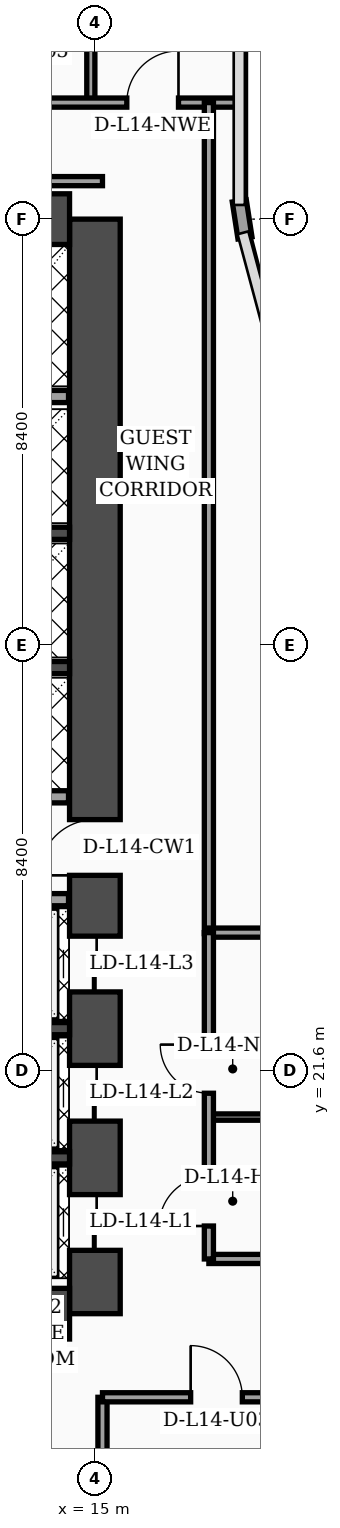
"""IFC4 building model, lengths in metres.
Left out: names, types, materials, properties, quantities, classifications, styles, units other than length and angle.
Written with IfcOpenShell. Run it as: python <this file> out.ifc"""

import sys

from ifc_helpers import new_model, si_unit, direction, frame, frame_2d, origin, place, context, subcontext, project, spatial, rectangle, extrude, element, fill, save


model = new_model("IFC4")
c1 = context("Model", 3, precision=1e-05, world=origin(), true_north=direction((0.0, 1.0)))
c2 = subcontext(c1, "Body", "Model", "MODEL_VIEW")
j1 = project(units=[si_unit("LENGTHUNIT", "METRE"), si_unit("PLANEANGLEUNIT", "RADIAN")], contexts=[c1])
p1 = place(None, origin())
s1 = spatial("IfcSite", under=j1, at=p1, CompositionType="ELEMENT")
p2 = place(p1, origin())
s2 = spatial("IfcBuilding", under=s1, at=p2, CompositionType="ELEMENT")
p3 = place(p2, frame((0.0, 0.0, 62.2)))
s3 = spatial("IfcBuildingStorey", under=s2, at=p3, CompositionType="ELEMENT", Elevation=62.2)
p4 = place(p3, frame((15.0, 16.8, 0.0), z_axis=(0.0, 0.0, 1.0), x_axis=(0.0, 1.0, 0.0)))
e1 = element("IfcWall", 1, at=p4, inside=s3, PredefinedType="SHEAR", context=c2, shape_type="SweptSolid", body=[
    extrude(rectangle(XDim=21.6, YDim=1.0, at=frame_2d((10.8, 0.0))), origin(), (0.0, 0.0, 1.0), 3.56),
])
p5 = place(p4, frame((8.65, 0.0, 0.0)))
e2 = element("IfcOpeningElement", 2, at=p5, cuts=e1, PredefinedType="OPENING", context=c2, shape_type="SweptSolid", body=[
    extrude(rectangle(XDim=1.1, YDim=2.2, at=frame_2d((0.55, 1.1))), frame((0.0, 0.51, 0.0), z_axis=(0.0, -1.0, 0.0), x_axis=(1.0, 0.0, 0.0)), (0.0, 0.0, 1.0), 1.02),
])
p6 = place(p4, frame((1.25, 0.0, 0.0)))
e3 = element("IfcOpeningElement", 3, at=p6, cuts=e1, PredefinedType="OPENING", context=c2, shape_type="SweptSolid", body=[
    extrude(rectangle(XDim=1.1, YDim=2.2, at=frame_2d((0.55, 1.1))), frame((0.0, 0.51, 0.0), z_axis=(0.0, -1.0, 0.0), x_axis=(1.0, 0.0, 0.0)), (0.0, 0.0, 1.0), 1.02),
])
p7 = place(p4, frame((3.8, 0.0, 0.0)))
e4 = element("IfcOpeningElement", 4, at=p7, cuts=e1, PredefinedType="OPENING", context=c2, shape_type="SweptSolid", body=[
    extrude(rectangle(XDim=1.1, YDim=2.2, at=frame_2d((0.55, 1.1))), frame((0.0, 0.51, 0.0), z_axis=(0.0, -1.0, 0.0), x_axis=(1.0, 0.0, 0.0)), (0.0, 0.0, 1.0), 1.02),
])
p8 = place(p4, frame((6.35, 0.0, 0.0)))
e5 = element("IfcOpeningElement", 5, at=p8, cuts=e1, PredefinedType="OPENING", context=c2, shape_type="SweptSolid", body=[
    extrude(rectangle(XDim=1.1, YDim=2.2, at=frame_2d((0.55, 1.1))), frame((0.0, 0.51, 0.0), z_axis=(0.0, -1.0, 0.0), x_axis=(1.0, 0.0, 0.0)), (0.0, 0.0, 1.0), 1.02),
])
for number, where, z_axis, x_axis in (
    (6, (4.7, 38.4, 0.0), (0.0, 0.0, 1.0), (1.0, 0.0, 0.0)),
    (7, (4.7, 16.8, 0.0), (0.0, 0.0, 1.0), (1.0, 0.0, 0.0)),
):
    element("IfcWall", number, at=place(p3, frame(where, z_axis=z_axis, x_axis=x_axis)), inside=s3, PredefinedType="SHEAR", context=c2, shape_type="SweptSolid", body=[
        extrude(rectangle(XDim=9.8, YDim=1.0, at=frame_2d((4.9, 0.0))), origin(), (0.0, 0.0, 1.0), 3.56),
    ])
for number, where, z_axis, x_axis in (
    (8, (12.18, 19.875, 0.0), (0.0, 0.0, 1.0), (1.0, 0.0, 0.0)),
    (9, (12.18, 22.425, 0.0), (0.0, 0.0, 1.0), (1.0, 0.0, 0.0)),
    (10, (12.18, 29.55, 0.0), (0.0, 0.0, 1.0), (1.0, 0.0, 0.0)),
    (11, (12.18, 32.2, 0.0), (0.0, 0.0, 1.0), (1.0, 0.0, 0.0)),
):
    element("IfcWall", number, at=place(p3, frame(where, z_axis=z_axis, x_axis=x_axis)), inside=s3, PredefinedType="SOLIDWALL", context=c2, shape_type="SweptSolid", body=[
        extrude(rectangle(XDim=2.32, YDim=0.24, at=frame_2d((1.16, 0.0))), origin(), (0.0, 0.0, 1.0), 3.56),
    ])
p9 = place(p3, frame((17.962, 38.03, 0.0), z_axis=(0.0, 0.0, 1.0), x_axis=(-0.15141125477, 0.988470855377, 0.0)))
e12 = element("IfcWall", 12, at=p9, inside=s3, PredefinedType="SOLIDWALL", context=c2, shape_type="SweptSolid", body=[
    extrude(rectangle(XDim=0.739, YDim=0.28, at=frame_2d((0.369, 0.0))), origin(), (0.0, 0.0, 1.0), 3.56),
])
p10 = place(p3, frame((12.15, 24.97, 0.0), z_axis=(0.0, 0.0, 1.0), x_axis=(1.0, 0.0, 0.0)))
e13 = element("IfcWall", 13, at=p10, inside=s3, PredefinedType="SOLIDWALL", context=c2, shape_type="SweptSolid", body=[
    extrude(rectangle(XDim=2.33, YDim=0.24, at=frame_2d((1.165, 0.0))), origin(), (0.0, 0.0, 1.0), 2.84),
])
p11 = place(p3, frame((12.25, 27.0, 0.0), z_axis=(0.0, 0.0, 1.0), x_axis=(1.0, 0.0, 0.0)))
e14 = element("IfcWall", 14, at=p11, inside=s3, PredefinedType="SOLIDWALL", context=c2, shape_type="SweptSolid", body=[
    extrude(rectangle(XDim=2.23, YDim=0.24, at=frame_2d((1.115, 0.0))), origin(), (0.0, 0.0, 1.0), 3.56),
])
p12 = place(p3, frame((9.66, 34.9, 0.0), z_axis=(0.0, 0.0, 1.0), x_axis=(1.0, 0.0, 0.0)))
e15 = element("IfcWall", 15, at=p12, inside=s3, PredefinedType="SOLIDWALL", context=c2, shape_type="SweptSolid", body=[
    extrude(rectangle(XDim=4.82, YDim=0.24, at=frame_2d((2.41, 0.0))), origin(), (0.0, 0.0, 1.0), 3.56),
])
p13 = place(p3, frame((15.15, 2.44, 0.0), z_axis=(0.0, 0.0, 1.0), x_axis=(0.0, 1.0, 0.0)))
e16 = element("IfcWall", 16, at=p13, inside=s3, PredefinedType="PARTITIONING", context=c2, shape_type="SweptSolid", body=[
    extrude(rectangle(XDim=12.71, YDim=0.18, at=frame_2d((6.355, 0.0))), origin(), (0.0, 0.0, 1.0), 3.04),
])
p14 = place(p3, frame((15.15, 15.15, 0.0), z_axis=(0.0, 0.0, 1.0), x_axis=(1.0, 0.0, 0.0)))
e17 = element("IfcWall", 17, at=p14, inside=s3, PredefinedType="PARTITIONING", context=c2, shape_type="SweptSolid", body=[
    extrude(rectangle(XDim=6.45, YDim=0.18, at=frame_2d((3.225, 0.0))), origin(), (0.0, 0.0, 1.0), 2.34),
])
p15 = place(p14, frame((1.74, 0.0, 0.0)))
e18 = element("IfcOpeningElement", 18, at=p15, cuts=e17, PredefinedType="OPENING", context=c2, shape_type="SweptSolid", body=[
    extrude(rectangle(XDim=1.02, YDim=2.2, at=frame_2d((0.51, 1.1))), frame((0.0, 0.1, 0.0), z_axis=(0.0, -1.0, 0.0), x_axis=(1.0, 0.0, 0.0)), (0.0, 0.0, 1.0), 0.2),
])
p16 = place(p3, frame((14.92, 40.7, 0.0), z_axis=(0.0, 0.0, 1.0), x_axis=(0.0, 1.0, 0.0)))
e19 = element("IfcWall", 19, at=p16, inside=s3, PredefinedType="PARTITIONING", context=c2, shape_type="SweptSolid", body=[
    extrude(rectangle(XDim=7.1, YDim=0.16, at=frame_2d((3.55, 0.0))), origin(), (0.0, 0.0, 1.0), 3.04),
])
p17 = place(p3, frame((0.08, 40.7, 0.0), z_axis=(0.0, 0.0, 1.0), x_axis=(1.0, 0.0, 0.0)))
e20 = element("IfcWall", 20, at=p17, inside=s3, PredefinedType="PARTITIONING", context=c2, shape_type="SweptSolid", body=[
    extrude(rectangle(XDim=17.77, YDim=0.18, at=frame_2d((8.885, 0.0))), origin(), (0.0, 0.0, 1.0), 2.84),
])
p18 = place(p17, frame((0.9, 0.0, 0.0)))
e21 = element("IfcOpeningElement", 21, at=p18, cuts=e20, PredefinedType="OPENING", context=c2, shape_type="SweptSolid", body=[
    extrude(rectangle(XDim=1.02, YDim=2.2, at=frame_2d((0.51, 1.1))), frame((0.0, 0.1, 0.0), z_axis=(0.0, -1.0, 0.0), x_axis=(1.0, 0.0, 0.0)), (0.0, 0.0, 1.0), 0.2),
])
p19 = place(p17, frame((4.57, 0.0, 0.0)))
e22 = element("IfcOpeningElement", 22, at=p19, cuts=e20, PredefinedType="OPENING", context=c2, shape_type="SweptSolid", body=[
    extrude(rectangle(XDim=1.02, YDim=2.2, at=frame_2d((0.51, 1.1))), frame((0.0, 0.1, 0.0), z_axis=(0.0, -1.0, 0.0), x_axis=(1.0, 0.0, 0.0)), (0.0, 0.0, 1.0), 0.2),
])
p20 = place(p17, frame((10.46, 0.0, 0.0)))
e23 = element("IfcOpeningElement", 23, at=p20, cuts=e20, PredefinedType="OPENING", context=c2, shape_type="SweptSolid", body=[
    extrude(rectangle(XDim=1.02, YDim=2.2, at=frame_2d((0.51, 1.1))), frame((0.0, 0.1, 0.0), z_axis=(0.0, -1.0, 0.0), x_axis=(1.0, 0.0, 0.0)), (0.0, 0.0, 1.0), 0.2),
])
p21 = place(p17, frame((15.55, 0.0, 0.0)))
e24 = element("IfcOpeningElement", 24, at=p21, cuts=e20, PredefinedType="OPENING", context=c2, shape_type="SweptSolid", body=[
    extrude(rectangle(XDim=1.02, YDim=2.2, at=frame_2d((0.51, 1.1))), frame((0.0, 0.1, 0.0), z_axis=(0.0, -1.0, 0.0), x_axis=(1.0, 0.0, 0.0)), (0.0, 0.0, 1.0), 0.2),
])
p22 = place(p3, frame((17.25, 24.3, 0.0), z_axis=(0.0, 0.0, 1.0), x_axis=(0.0, 1.0, 0.0)))
e25 = element("IfcWall", 25, at=p22, inside=s3, PredefinedType="PARTITIONING", context=c2, shape_type="SweptSolid", body=[
    extrude(rectangle(XDim=16.4, YDim=0.18, at=frame_2d((8.2, 0.0))), origin(), (0.0, 0.0, 1.0), 2.84),
])
p23 = place(p3, frame((3.68, 39.15, 0.0), z_axis=(0.0, 0.0, 1.0), x_axis=(1.0, 0.0, 0.0)))
e26 = element("IfcWall", 26, at=p23, inside=s3, PredefinedType="PARTITIONING", context=c2, shape_type="SweptSolid", body=[
    extrude(rectangle(XDim=11.47, YDim=0.18, at=frame_2d((5.735, 0.0))), origin(), (0.0, 0.0, 1.0), 2.84),
])
p24 = place(p3, frame((17.25, 17.88, 0.0), z_axis=(0.0, 0.0, 1.0), x_axis=(1.0, 0.0, 0.0)))
e27 = element("IfcWall", 27, at=p24, inside=s3, PredefinedType="PARTITIONING", context=c2, shape_type="SweptSolid", body=[
    extrude(rectangle(XDim=4.3, YDim=0.18, at=frame_2d((2.15, 0.0))), origin(), (0.0, 0.0, 1.0), 3.56),
])
p25 = place(p3, frame((17.25, 20.68, 0.0), z_axis=(0.0, 0.0, 1.0), x_axis=(1.0, 0.0, 0.0)))
e28 = element("IfcWall", 28, at=p25, inside=s3, PredefinedType="PARTITIONING", context=c2, shape_type="SweptSolid", body=[
    extrude(rectangle(XDim=4.3, YDim=0.125, at=frame_2d((2.15, 0.0))), origin(), (0.0, 0.0, 1.0), 3.56),
])
p26 = place(p3, frame((17.25, 24.32, 0.0), z_axis=(0.0, 0.0, 1.0), x_axis=(1.0, 0.0, 0.0)))
e29 = element("IfcWall", 29, at=p26, inside=s3, PredefinedType="PARTITIONING", context=c2, shape_type="SweptSolid", body=[
    extrude(rectangle(XDim=4.35, YDim=0.18, at=frame_2d((2.175, 0.0))), origin(), (0.0, 0.0, 1.0), 3.56),
])
p27 = place(p3, frame((17.25, 17.88, 0.0), z_axis=(0.0, 0.0, 1.0), x_axis=(0.0, 1.0, 0.0)))
e30 = element("IfcWall", 30, at=p27, inside=s3, PredefinedType="PARTITIONING", context=c2, shape_type="SweptSolid", body=[
    extrude(rectangle(XDim=6.44, YDim=0.18, at=frame_2d((3.22, 0.0))), origin(), (0.0, 0.0, 1.0), 3.09),
])
p28 = place(p27, frame((0.65, 0.0, 0.0)))
e31 = element("IfcOpeningElement", 31, at=p28, cuts=e30, PredefinedType="OPENING", context=c2, shape_type="SweptSolid", body=[
    extrude(rectangle(XDim=0.98, YDim=2.15, at=frame_2d((0.49, 1.075))), frame((0.0, 0.1, 0.0), z_axis=(0.0, -1.0, 0.0), x_axis=(1.0, 0.0, 0.0)), (0.0, 0.0, 1.0), 0.2),
])
p29 = place(p27, frame((3.27, 0.0, 0.0)))
e32 = element("IfcOpeningElement", 32, at=p29, cuts=e30, PredefinedType="OPENING", context=c2, shape_type="SweptSolid", body=[
    extrude(rectangle(XDim=0.96, YDim=2.2, at=frame_2d((0.48, 1.1))), frame((0.0, 0.1, 0.0), z_axis=(0.0, -1.0, 0.0), x_axis=(1.0, 0.0, 0.0)), (0.0, 0.0, 1.0), 0.2),
])
p30 = place(p15, origin())
e33 = element("IfcDoor", 33, at=p30, inside=s3, OperationType="SINGLE_SWING_LEFT", PredefinedType="DOOR", context=c2, shape_type="SweptSolid", body=[
    extrude(rectangle(XDim=1.02, YDim=2.2, at=frame_2d((0.51, 1.1))), frame((0.0, 0.025, 0.0), z_axis=(0.0, -1.0, 0.0), x_axis=(1.0, 0.0, 0.0)), (0.0, 0.0, 1.0), 0.05),
])
fill(e18, e33)
p31 = place(p21, origin())
e34 = element("IfcDoor", 34, at=p31, inside=s3, OperationType="SINGLE_SWING_RIGHT", PredefinedType="DOOR", context=c2, shape_type="SweptSolid", body=[
    extrude(rectangle(XDim=1.02, YDim=2.2, at=frame_2d((0.51, 1.1))), frame((0.0, 0.025, 0.0), z_axis=(0.0, -1.0, 0.0), x_axis=(1.0, 0.0, 0.0)), (0.0, 0.0, 1.0), 0.05),
])
fill(e24, e34)
p32 = place(p28, origin())
e35 = element("IfcDoor", 35, at=p32, inside=s3, OperationType="SINGLE_SWING_LEFT", PredefinedType="DOOR", context=c2, shape_type="SweptSolid", body=[
    extrude(rectangle(XDim=0.98, YDim=2.15, at=frame_2d((0.49, 1.075))), frame((0.0, 0.025, 0.0), z_axis=(0.0, -1.0, 0.0), x_axis=(1.0, 0.0, 0.0)), (0.0, 0.0, 1.0), 0.05),
])
fill(e31, e35)
p33 = place(p29, origin())
e36 = element("IfcDoor", 36, at=p33, inside=s3, OperationType="SINGLE_SWING_RIGHT", PredefinedType="DOOR", context=c2, shape_type="SweptSolid", body=[
    extrude(rectangle(XDim=0.96, YDim=2.2, at=frame_2d((0.48, 1.1))), frame((0.0, 0.025, 0.0), z_axis=(0.0, -1.0, 0.0), x_axis=(1.0, 0.0, 0.0)), (0.0, 0.0, 1.0), 0.05),
])
fill(e32, e36)
p34 = place(p5, origin())
e37 = element("IfcDoor", 37, at=p34, inside=s3, OperationType="SINGLE_SWING_LEFT", PredefinedType="DOOR", context=c2, shape_type="SweptSolid", body=[
    extrude(rectangle(XDim=1.1, YDim=2.2, at=frame_2d((0.55, 1.1))), frame((0.0, 0.025, 0.0), z_axis=(0.0, -1.0, 0.0), x_axis=(1.0, 0.0, 0.0)), (0.0, 0.0, 1.0), 0.05),
])
fill(e2, e37)
p35 = place(p6, origin())
e38 = element("IfcDoor", 38, at=p35, inside=s3, OperationType="DOUBLE_DOOR_SLIDING", PredefinedType="DOOR", context=c2, shape_type="SweptSolid", body=[
    extrude(rectangle(XDim=1.1, YDim=2.2, at=frame_2d((0.55, 1.1))), frame((0.0, 0.025, 0.0), z_axis=(0.0, -1.0, 0.0), x_axis=(1.0, 0.0, 0.0)), (0.0, 0.0, 1.0), 0.05),
])
fill(e3, e38)
p36 = place(p7, origin())
e39 = element("IfcDoor", 39, at=p36, inside=s3, OperationType="DOUBLE_DOOR_SLIDING", PredefinedType="DOOR", context=c2, shape_type="SweptSolid", body=[
    extrude(rectangle(XDim=1.1, YDim=2.2, at=frame_2d((0.55, 1.1))), frame((0.0, 0.025, 0.0), z_axis=(0.0, -1.0, 0.0), x_axis=(1.0, 0.0, 0.0)), (0.0, 0.0, 1.0), 0.05),
])
fill(e4, e39)
p37 = place(p8, origin())
e40 = element("IfcDoor", 40, at=p37, inside=s3, OperationType="DOUBLE_DOOR_SLIDING", PredefinedType="DOOR", context=c2, shape_type="SweptSolid", body=[
    extrude(rectangle(XDim=1.1, YDim=2.2, at=frame_2d((0.55, 1.1))), frame((0.0, 0.025, 0.0), z_axis=(0.0, -1.0, 0.0), x_axis=(1.0, 0.0, 0.0)), (0.0, 0.0, 1.0), 0.05),
])
fill(e5, e40)
save(model, sys.argv[1])
